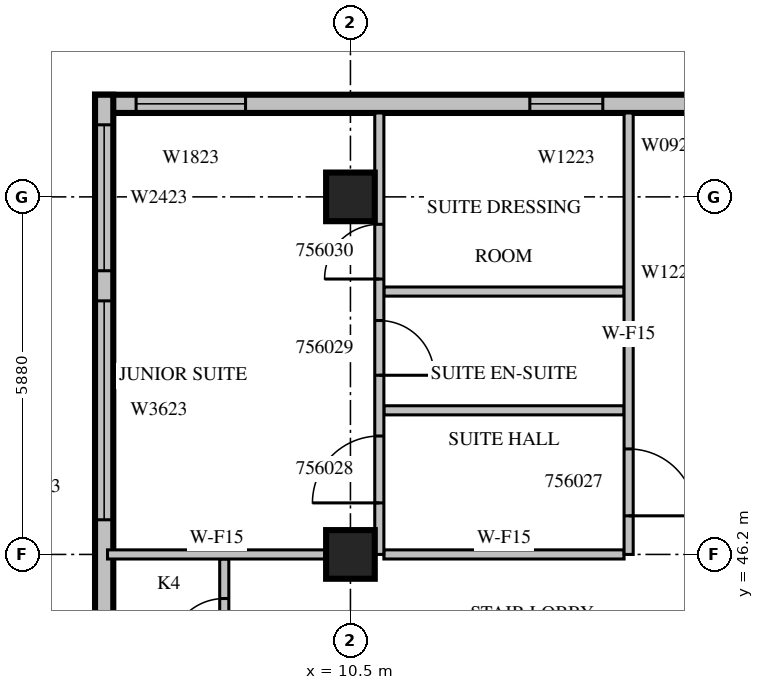
"""IFC4 building model, lengths in metres.
Left out: names, types, materials, properties, quantities, classifications, styles, units other than length and angle.
Written with IfcOpenShell. Run it as: python <this file> out.ifc"""

import sys

from ifc_helpers import new_model, si_unit, direction, frame, frame_2d, origin, origin_2d, place, context, subcontext, project, spatial, rectangle, extrude, source, transform, mapped, element, fill, save


model = new_model("IFC4")
c1 = context("Model", 3, precision=1e-05, world=origin(), true_north=direction((0.0, 1.0)))
c2 = subcontext(c1, "Body", "Model", "MODEL_VIEW")
j1 = project(units=[si_unit("LENGTHUNIT", "METRE"), si_unit("PLANEANGLEUNIT", "RADIAN")], contexts=[c1])
p1 = place(None, origin())
s1 = spatial("IfcSite", under=j1, at=p1, CompositionType="ELEMENT")
p2 = place(p1, origin())
s2 = spatial("IfcBuilding", under=s1, at=p2, CompositionType="ELEMENT")
p3 = place(p2, frame((0.0, 0.0, 246.2)))
s3 = spatial("IfcBuildingStorey", under=s2, at=p3, CompositionType="ELEMENT", Elevation=246.2)
m1 = source(origin(), c2, "Body", "SweptSolid", [
    extrude(rectangle(XDim=0.8, YDim=0.8, at=origin_2d()), origin(), (0.0, 0.0, 1.0), 3.8),
])
for number, where, z_axis, x_axis in (
    (1, (10.5, 46.2, 0.0), (0.0, 0.0, 1.0), (1.0, 0.0, 0.0)),
    (2, (10.5, 52.08, 0.0), (0.0, 0.0, 1.0), (1.0, 0.0, 0.0)),
):
    element("IfcColumn", number, at=place(p3, frame(where, z_axis=z_axis, x_axis=x_axis)), inside=s3, PredefinedType="COLUMN", context=c2, shape_type="MappedRepresentation", body=[
        mapped(m1, transform((0.0, 0.0, 0.0), scale=1.0)),
    ])
m2 = source(origin(), c2, "Body", "SweptSolid", [
    extrude(rectangle(XDim=10.5, YDim=0.3, at=frame_2d((5.25, 0.0))), origin(), (0.0, 0.0, 1.0), 3.4),
])
p4 = place(p3, frame((16.8, 53.61, 0.0), z_axis=(0.0, 0.0, 1.0), x_axis=(-1.0, 0.0, 0.0)))
e3 = element("IfcWall", 3, at=p4, inside=s3, PredefinedType="STANDARD", context=c2, shape_type="MappedRepresentation", body=[
    mapped(m2, transform((0.0, 0.0, 0.0), scale=1.0)),
])
m3 = source(origin(), c2, "Body", "SweptSolid", [
    extrude(rectangle(XDim=1.2, YDim=2.3, at=frame_2d((0.6, 1.15))), frame((0.0, 0.16, 0.0), z_axis=(0.0, -1.0, 0.0), x_axis=(1.0, 0.0, 0.0)), (0.0, 0.0, 1.0), 0.32),
])
p5 = place(p4, frame((2.15, 0.0, 0.6)))
e4 = element("IfcOpeningElement", 4, at=p5, cuts=e3, PredefinedType="OPENING", context=c2, shape_type="MappedRepresentation", body=[
    mapped(m3, transform((0.0, 0.0, 0.0), scale=1.0)),
])
m4 = source(origin(), c2, "Body", "SweptSolid", [
    extrude(rectangle(XDim=1.8, YDim=2.3, at=frame_2d((0.9, 1.15))), frame((0.0, 0.16, 0.0), z_axis=(0.0, -1.0, 0.0), x_axis=(1.0, 0.0, 0.0)), (0.0, 0.0, 1.0), 0.32),
])
p6 = place(p4, frame((8.025, 0.0, 0.6)))
e5 = element("IfcOpeningElement", 5, at=p6, cuts=e3, PredefinedType="OPENING", context=c2, shape_type="MappedRepresentation", body=[
    mapped(m4, transform((0.0, 0.0, 0.0), scale=1.0)),
])
m5 = source(origin(), c2, "Body", "SweptSolid", [
    extrude(rectangle(XDim=9.91, YDim=0.3, at=frame_2d((4.955, 0.0))), origin(), (0.0, 0.0, 1.0), 3.4),
])
p7 = place(p3, frame((6.45, 53.76, 0.0), z_axis=(0.0, 0.0, 1.0), x_axis=(0.0, -1.0, 0.0)))
e6 = element("IfcWall", 6, at=p7, inside=s3, PredefinedType="STANDARD", context=c2, shape_type="MappedRepresentation", body=[
    mapped(m5, transform((0.0, 0.0, 0.0), scale=1.0)),
])
m6 = source(origin(), c2, "Body", "SweptSolid", [
    extrude(rectangle(XDim=3.6, YDim=2.3, at=frame_2d((1.8, 1.15))), frame((0.0, 0.16, 0.0), z_axis=(0.0, -1.0, 0.0), x_axis=(1.0, 0.0, 0.0)), (0.0, 0.0, 1.0), 0.32),
])
p8 = place(p7, frame((3.39, 0.0, 0.6)))
e7 = element("IfcOpeningElement", 7, at=p8, cuts=e6, PredefinedType="OPENING", context=c2, shape_type="MappedRepresentation", body=[
    mapped(m6, transform((0.0, 0.0, 0.0), scale=1.0)),
])
m7 = source(origin(), c2, "Body", "SweptSolid", [
    extrude(rectangle(XDim=2.4, YDim=2.3, at=frame_2d((1.2, 1.15))), frame((0.0, 0.16, 0.0), z_axis=(0.0, -1.0, 0.0), x_axis=(1.0, 0.0, 0.0)), (0.0, 0.0, 1.0), 0.32),
])
p9 = place(p7, frame((0.495, 0.0, 0.6)))
e8 = element("IfcOpeningElement", 8, at=p9, cuts=e6, PredefinedType="OPENING", context=c2, shape_type="MappedRepresentation", body=[
    mapped(m7, transform((0.0, 0.0, 0.0), scale=1.0)),
])
m8 = source(origin(), c2, "Body", "SweptSolid", [
    extrude(rectangle(XDim=2.2, YDim=0.15, at=frame_2d((1.1, 0.0))), origin(), (0.0, 0.0, 1.0), 3.4),
])
p10 = place(p3, frame((8.425, 43.925, 0.0), z_axis=(0.0, 0.0, 1.0), x_axis=(0.0, 1.0, 0.0)))
e9 = element("IfcWall", 9, at=p10, inside=s3, PredefinedType="PARTITIONING", context=c2, shape_type="MappedRepresentation", body=[
    mapped(m8, transform((0.0, 0.0, 0.0), scale=1.0)),
])
m9 = source(origin(), c2, "Body", "SweptSolid", [
    extrude(rectangle(XDim=0.9, YDim=2.1, at=frame_2d((0.45, 1.05))), frame((0.0, 0.085, 0.0), z_axis=(0.0, -1.0, 0.0), x_axis=(1.0, 0.0, 0.0)), (0.0, 0.0, 1.0), 0.17),
])
p11 = place(p10, frame((0.65, 0.0, 0.0)))
e10 = element("IfcOpeningElement", 10, at=p11, cuts=e9, PredefinedType="OPENING", context=c2, shape_type="MappedRepresentation", body=[
    mapped(m9, transform((0.0, 0.0, 0.0), scale=1.0)),
])
m10 = source(origin(), c2, "Body", "SweptSolid", [
    extrude(rectangle(XDim=3.95, YDim=0.15, at=frame_2d((1.975, 0.0))), origin(), (0.0, 0.0, 1.0), 3.4),
])
for number, where, z_axis, x_axis in (
    (11, (15.0, 48.57, 0.0), (0.0, 0.0, 1.0), (-1.0, 0.0, 0.0)),
    (12, (15.0, 50.523, 0.0), (0.0, 0.0, 1.0), (-1.0, 0.0, 0.0)),
):
    element("IfcWall", number, at=place(p3, frame(where, z_axis=z_axis, x_axis=x_axis)), inside=s3, PredefinedType="PARTITIONING", context=c2, shape_type="MappedRepresentation", body=[
        mapped(m10, transform((0.0, 0.0, 0.0), scale=1.0)),
    ])
m11 = source(origin(), c2, "Body", "SweptSolid", [
    extrude(rectangle(XDim=3.596, YDim=0.15, at=frame_2d((1.798, 0.0))), origin(), (0.0, 0.0, 1.0), 3.4),
])
p12 = place(p3, frame((10.101, 46.2, 0.0), z_axis=(0.0, 0.0, 1.0), x_axis=(-1.0, 0.0, 0.0)))
e13 = element("IfcWall", 13, at=p12, inside=s3, PredefinedType="PARTITIONING", context=c2, shape_type="MappedRepresentation", body=[
    mapped(m11, transform((0.0, 0.0, 0.0), scale=1.0)),
])
p13 = place(p3, frame((15.0, 46.2, 0.0), z_axis=(0.0, 0.0, 1.0), x_axis=(-1.0, 0.0, 0.0)))
e14 = element("IfcWall", 14, at=p13, inside=s3, PredefinedType="PARTITIONING", context=c2, shape_type="MappedRepresentation", body=[
    mapped(m10, transform((0.0, 0.0, 0.0), scale=1.0)),
])
m12 = source(origin(), c2, "Body", "SweptSolid", [
    extrude(rectangle(XDim=7.26, YDim=0.15, at=frame_2d((3.63, 0.0))), origin(), (0.0, 0.0, 1.0), 3.4),
])
p14 = place(p3, frame((10.975, 46.2, 0.0), z_axis=(0.0, 0.0, 1.0), x_axis=(0.0, 1.0, 0.0)))
e15 = element("IfcWall", 15, at=p14, inside=s3, PredefinedType="PARTITIONING", context=c2, shape_type="MappedRepresentation", body=[
    mapped(m12, transform((0.0, 0.0, 0.0), scale=1.0)),
])
m13 = source(origin(), c2, "Body", "SweptSolid", [
    extrude(rectangle(XDim=1.1, YDim=2.1, at=frame_2d((0.55, 1.05))), frame((0.0, 0.085, 0.0), z_axis=(0.0, -1.0, 0.0), x_axis=(1.0, 0.0, 0.0)), (0.0, 0.0, 1.0), 0.17),
])
p15 = place(p14, frame((0.847, 0.0, 0.0)))
e16 = element("IfcOpeningElement", 16, at=p15, cuts=e15, PredefinedType="OPENING", context=c2, shape_type="MappedRepresentation", body=[
    mapped(m13, transform((0.0, 0.0, 0.0), scale=1.0)),
])
p16 = place(p14, frame((2.946, 0.0, 0.0)))
e17 = element("IfcOpeningElement", 17, at=p16, cuts=e15, PredefinedType="OPENING", context=c2, shape_type="MappedRepresentation", body=[
    mapped(m9, transform((0.0, 0.0, 0.0), scale=1.0)),
])
p17 = place(p14, frame((4.529, 0.0, 0.0)))
e18 = element("IfcOpeningElement", 18, at=p17, cuts=e15, PredefinedType="OPENING", context=c2, shape_type="MappedRepresentation", body=[
    mapped(m9, transform((0.0, 0.0, 0.0), scale=1.0)),
])
p18 = place(p3, frame((15.075, 46.2, 0.0), z_axis=(0.0, 0.0, 1.0), x_axis=(0.0, 1.0, 0.0)))
e19 = element("IfcWall", 19, at=p18, inside=s3, PredefinedType="PARTITIONING", context=c2, shape_type="MappedRepresentation", body=[
    mapped(m12, transform((0.0, 0.0, 0.0), scale=1.0)),
])
p19 = place(p18, frame((0.635, 0.0, 0.0)))
e20 = element("IfcOpeningElement", 20, at=p19, cuts=e19, PredefinedType="OPENING", context=c2, shape_type="MappedRepresentation", body=[
    mapped(m13, transform((0.0, 0.0, 0.0), scale=1.0)),
])
m14 = source(origin(), c2, "Body", "SweptSolid", [
    extrude(rectangle(XDim=1.2, YDim=2.3, at=frame_2d((0.6, 1.15))), frame((0.0, 0.03, 0.0), z_axis=(0.0, -1.0, 0.0), x_axis=(1.0, 0.0, 0.0)), (0.0, 0.0, 1.0), 0.06),
])
p20 = place(p5, origin())
e21 = element("IfcWindow", 21, at=p20, inside=s3, PartitioningType="SINGLE_PANEL", PredefinedType="WINDOW", context=c2, shape_type="MappedRepresentation", body=[
    mapped(m14, transform((0.0, 0.0, 0.0), scale=1.0)),
])
fill(e4, e21)
m15 = source(origin(), c2, "Body", "SweptSolid", [
    extrude(rectangle(XDim=1.8, YDim=2.3, at=frame_2d((0.9, 1.15))), frame((0.0, 0.03, 0.0), z_axis=(0.0, -1.0, 0.0), x_axis=(1.0, 0.0, 0.0)), (0.0, 0.0, 1.0), 0.06),
])
p21 = place(p6, origin())
e22 = element("IfcWindow", 22, at=p21, inside=s3, PartitioningType="SINGLE_PANEL", PredefinedType="WINDOW", context=c2, shape_type="MappedRepresentation", body=[
    mapped(m15, transform((0.0, 0.0, 0.0), scale=1.0)),
])
fill(e5, e22)
m16 = source(origin(), c2, "Body", "SweptSolid", [
    extrude(rectangle(XDim=3.6, YDim=2.3, at=frame_2d((1.8, 1.15))), frame((0.0, 0.03, 0.0), z_axis=(0.0, -1.0, 0.0), x_axis=(1.0, 0.0, 0.0)), (0.0, 0.0, 1.0), 0.06),
])
p22 = place(p8, origin())
e23 = element("IfcWindow", 23, at=p22, inside=s3, PartitioningType="SINGLE_PANEL", PredefinedType="WINDOW", context=c2, shape_type="MappedRepresentation", body=[
    mapped(m16, transform((0.0, 0.0, 0.0), scale=1.0)),
])
fill(e7, e23)
m17 = source(origin(), c2, "Body", "SweptSolid", [
    extrude(rectangle(XDim=2.4, YDim=2.3, at=frame_2d((1.2, 1.15))), frame((0.0, 0.03, 0.0), z_axis=(0.0, -1.0, 0.0), x_axis=(1.0, 0.0, 0.0)), (0.0, 0.0, 1.0), 0.06),
])
p23 = place(p9, origin())
e24 = element("IfcWindow", 24, at=p23, inside=s3, PartitioningType="SINGLE_PANEL", PredefinedType="WINDOW", context=c2, shape_type="MappedRepresentation", body=[
    mapped(m17, transform((0.0, 0.0, 0.0), scale=1.0)),
])
fill(e8, e24)
m18 = source(origin(), c2, "Body", "SweptSolid", [
    extrude(rectangle(XDim=0.9, YDim=2.1, at=frame_2d((0.45, 1.05))), frame((0.0, 0.025, 0.0), z_axis=(0.0, -1.0, 0.0), x_axis=(1.0, 0.0, 0.0)), (0.0, 0.0, 1.0), 0.05),
])
p24 = place(p11, origin())
e25 = element("IfcDoor", 25, at=p24, inside=s3, OperationType="SINGLE_SWING_LEFT", PredefinedType="DOOR", context=c2, shape_type="MappedRepresentation", body=[
    mapped(m18, transform((0.0, 0.0, 0.0), scale=1.0)),
])
fill(e10, e25)
m19 = source(origin(), c2, "Body", "SweptSolid", [
    extrude(rectangle(XDim=1.1, YDim=2.1, at=frame_2d((0.55, 1.05))), frame((0.0, 0.025, 0.0), z_axis=(0.0, -1.0, 0.0), x_axis=(1.0, 0.0, 0.0)), (0.0, 0.0, 1.0), 0.05),
])
p25 = place(p19, origin())
e26 = element("IfcDoor", 26, at=p25, inside=s3, OperationType="SINGLE_SWING_RIGHT", PredefinedType="DOOR", context=c2, shape_type="MappedRepresentation", body=[
    mapped(m19, transform((0.0, 0.0, 0.0), scale=1.0)),
])
fill(e20, e26)
p26 = place(p15, origin())
e27 = element("IfcDoor", 27, at=p26, inside=s3, OperationType="SINGLE_SWING_LEFT", PredefinedType="DOOR", context=c2, shape_type="MappedRepresentation", body=[
    mapped(m19, transform((0.0, 0.0, 0.0), scale=1.0)),
])
fill(e16, e27)
p27 = place(p16, origin())
e28 = element("IfcDoor", 28, at=p27, inside=s3, OperationType="SINGLE_SWING_RIGHT", PredefinedType="DOOR", context=c2, shape_type="MappedRepresentation", body=[
    mapped(m18, transform((0.0, 0.0, 0.0), scale=1.0)),
])
fill(e17, e28)
p28 = place(p17, origin())
e29 = element("IfcDoor", 29, at=p28, inside=s3, OperationType="SINGLE_SWING_LEFT", PredefinedType="DOOR", context=c2, shape_type="MappedRepresentation", body=[
    mapped(m18, transform((0.0, 0.0, 0.0), scale=1.0)),
])
fill(e18, e29)
save(model, sys.argv[1])
